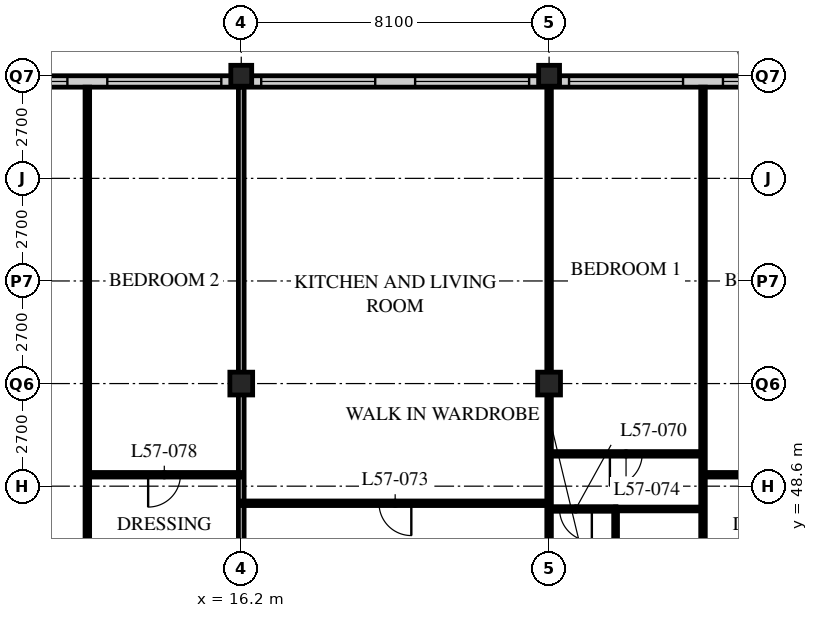
"""IFC4 building model, lengths in metres.
Left out: names, types, materials, properties, quantities, classifications, styles, units other than length and angle.
Written with IfcOpenShell. Run it as: python <this file> out.ifc"""

import sys

from ifc_helpers import new_model, si_unit, direction, frame, frame_2d, origin, origin_2d, place, context, subcontext, project, spatial, rectangle, hollow_rectangle, extrude, element, fill, save


model = new_model("IFC4")
c1 = context("Model", 3, precision=1e-05, world=origin(), true_north=direction((0.0, 1.0)))
c2 = subcontext(c1, "Body", "Model", "MODEL_VIEW")
j1 = project(units=[si_unit("LENGTHUNIT", "METRE"), si_unit("PLANEANGLEUNIT", "RADIAN")], contexts=[c1])
p1 = place(None, origin())
s1 = spatial("IfcSite", under=j1, at=p1, CompositionType="ELEMENT")
p2 = place(p1, origin())
s2 = spatial("IfcBuilding", under=s1, at=p2, CompositionType="ELEMENT")
p3 = place(p2, frame((0.0, 0.0, 220.8)))
s3 = spatial("IfcBuildingStorey", under=s2, at=p3, CompositionType="ELEMENT", Elevation=220.8)
p4 = place(p3, frame((16.2, 51.3, 0.0), z_axis=(0.0, 0.0, 1.0), x_axis=(1.0, 0.0, 0.0)))
e1 = element("IfcColumn", 1, at=p4, inside=s3, PredefinedType="COLUMN", context=c2, shape_type="SweptSolid", body=[
    extrude(hollow_rectangle(XDim=0.6, YDim=0.6, WallThickness=0.05, at=origin_2d()), origin(), (0.0, 0.0, 1.0), 3.6),
])
p5 = place(p3, frame((16.2, 59.4, 0.0), z_axis=(0.0, 0.0, 1.0), x_axis=(1.0, 0.0, 0.0)))
e2 = element("IfcColumn", 2, at=p5, inside=s3, PredefinedType="COLUMN", context=c2, shape_type="SweptSolid", body=[
    extrude(hollow_rectangle(XDim=0.55, YDim=0.55, WallThickness=0.045, at=origin_2d()), origin(), (0.0, 0.0, 1.0), 3.6),
])
p6 = place(p3, frame((24.3, 51.3, 0.0), z_axis=(0.0, 0.0, 1.0), x_axis=(1.0, 0.0, 0.0)))
e3 = element("IfcColumn", 3, at=p6, inside=s3, PredefinedType="COLUMN", context=c2, shape_type="SweptSolid", body=[
    extrude(hollow_rectangle(XDim=0.6, YDim=0.6, WallThickness=0.05, at=origin_2d()), origin(), (0.0, 0.0, 1.0), 3.6),
])
p7 = place(p3, frame((24.3, 59.4, 0.0), z_axis=(0.0, 0.0, 1.0), x_axis=(1.0, 0.0, 0.0)))
e4 = element("IfcColumn", 4, at=p7, inside=s3, PredefinedType="COLUMN", context=c2, shape_type="SweptSolid", body=[
    extrude(hollow_rectangle(XDim=0.55, YDim=0.55, WallThickness=0.045, at=origin_2d()), origin(), (0.0, 0.0, 1.0), 3.6),
])
p8 = place(p3, frame((48.3, 59.25, 0.0), z_axis=(0.0, 0.0, 1.0), x_axis=(-1.0, 0.0, 0.0)))
e5 = element("IfcWall", 5, at=p8, inside=s3, PredefinedType="SOLIDWALL", context=c2, shape_type="SweptSolid", body=[
    extrude(rectangle(XDim=40.2, YDim=0.3, at=frame_2d((20.1, 0.0))), origin(), (0.0, 0.0, 1.0), 3.39),
])
p9 = place(p8, frame((0.225, 0.0, 0.6)))
e6 = element("IfcOpeningElement", 6, at=p9, cuts=e5, PredefinedType="OPENING", context=c2, shape_type="SweptSolid", body=[
    extrude(rectangle(XDim=3.0, YDim=2.0, at=frame_2d((1.5, 1.0))), frame((0.0, 0.16, 0.0), z_axis=(0.0, -1.0, 0.0), x_axis=(1.0, 0.0, 0.0)), (0.0, 0.0, 1.0), 0.32),
])
p10 = place(p8, frame((4.275, 0.0, 0.6)))
e7 = element("IfcOpeningElement", 7, at=p10, cuts=e5, PredefinedType="OPENING", context=c2, shape_type="SweptSolid", body=[
    extrude(rectangle(XDim=3.0, YDim=2.0, at=frame_2d((1.5, 1.0))), frame((0.0, 0.16, 0.0), z_axis=(0.0, -1.0, 0.0), x_axis=(1.0, 0.0, 0.0)), (0.0, 0.0, 1.0), 0.32),
])
p11 = place(p8, frame((8.325, 0.0, 0.6)))
e8 = element("IfcOpeningElement", 8, at=p11, cuts=e5, PredefinedType="OPENING", context=c2, shape_type="SweptSolid", body=[
    extrude(rectangle(XDim=3.0, YDim=2.0, at=frame_2d((1.5, 1.0))), frame((0.0, 0.16, 0.0), z_axis=(0.0, -1.0, 0.0), x_axis=(1.0, 0.0, 0.0)), (0.0, 0.0, 1.0), 0.32),
])
p12 = place(p8, frame((12.375, 0.0, 0.6)))
e9 = element("IfcOpeningElement", 9, at=p12, cuts=e5, PredefinedType="OPENING", context=c2, shape_type="SweptSolid", body=[
    extrude(rectangle(XDim=3.0, YDim=2.0, at=frame_2d((1.5, 1.0))), frame((0.0, 0.16, 0.0), z_axis=(0.0, -1.0, 0.0), x_axis=(1.0, 0.0, 0.0)), (0.0, 0.0, 1.0), 0.32),
])
p13 = place(p8, frame((16.425, 0.0, 0.6)))
e10 = element("IfcOpeningElement", 10, at=p13, cuts=e5, PredefinedType="OPENING", context=c2, shape_type="SweptSolid", body=[
    extrude(rectangle(XDim=3.0, YDim=2.0, at=frame_2d((1.5, 1.0))), frame((0.0, 0.16, 0.0), z_axis=(0.0, -1.0, 0.0), x_axis=(1.0, 0.0, 0.0)), (0.0, 0.0, 1.0), 0.32),
])
p14 = place(p8, frame((20.475, 0.0, 0.6)))
e11 = element("IfcOpeningElement", 11, at=p14, cuts=e5, PredefinedType="OPENING", context=c2, shape_type="SweptSolid", body=[
    extrude(rectangle(XDim=3.0, YDim=2.0, at=frame_2d((1.5, 1.0))), frame((0.0, 0.16, 0.0), z_axis=(0.0, -1.0, 0.0), x_axis=(1.0, 0.0, 0.0)), (0.0, 0.0, 1.0), 0.32),
])
p15 = place(p8, frame((24.525, 0.0, 0.6)))
e12 = element("IfcOpeningElement", 12, at=p15, cuts=e5, PredefinedType="OPENING", context=c2, shape_type="SweptSolid", body=[
    extrude(rectangle(XDim=3.0, YDim=2.0, at=frame_2d((1.5, 1.0))), frame((0.0, 0.16, 0.0), z_axis=(0.0, -1.0, 0.0), x_axis=(1.0, 0.0, 0.0)), (0.0, 0.0, 1.0), 0.32),
])
p16 = place(p8, frame((28.575, 0.0, 0.6)))
e13 = element("IfcOpeningElement", 13, at=p16, cuts=e5, PredefinedType="OPENING", context=c2, shape_type="SweptSolid", body=[
    extrude(rectangle(XDim=3.0, YDim=2.0, at=frame_2d((1.5, 1.0))), frame((0.0, 0.16, 0.0), z_axis=(0.0, -1.0, 0.0), x_axis=(1.0, 0.0, 0.0)), (0.0, 0.0, 1.0), 0.32),
])
p17 = place(p8, frame((32.625, 0.0, 0.6)))
e14 = element("IfcOpeningElement", 14, at=p17, cuts=e5, PredefinedType="OPENING", context=c2, shape_type="SweptSolid", body=[
    extrude(rectangle(XDim=3.0, YDim=2.0, at=frame_2d((1.5, 1.0))), frame((0.0, 0.16, 0.0), z_axis=(0.0, -1.0, 0.0), x_axis=(1.0, 0.0, 0.0)), (0.0, 0.0, 1.0), 0.32),
])
p18 = place(p8, frame((36.675, 0.0, 0.6)))
e15 = element("IfcOpeningElement", 15, at=p18, cuts=e5, PredefinedType="OPENING", context=c2, shape_type="SweptSolid", body=[
    extrude(rectangle(XDim=3.0, YDim=2.0, at=frame_2d((1.5, 1.0))), frame((0.0, 0.16, 0.0), z_axis=(0.0, -1.0, 0.0), x_axis=(1.0, 0.0, 0.0)), (0.0, 0.0, 1.0), 0.32),
])
p19 = place(p3, frame((26.05, 45.6, 0.0), z_axis=(0.0, 0.0, 1.0), x_axis=(0.0, 1.0, 0.0)))
e16 = element("IfcWall", 16, at=p19, inside=s3, PredefinedType="PARTITIONING", context=c2, shape_type="SweptSolid", body=[
    extrude(rectangle(XDim=2.4, YDim=0.1, at=frame_2d((1.2, 0.0))), origin(), (0.0, 0.0, 1.0), 3.39),
])
p20 = place(p19, frame((0.8, 0.0, 0.0)))
e17 = element("IfcOpeningElement", 17, at=p20, cuts=e16, PredefinedType="OPENING", context=c2, shape_type="SweptSolid", body=[
    extrude(rectangle(XDim=0.8, YDim=2.1, at=frame_2d((0.4, 1.05))), frame((0.0, 0.06, 0.0), z_axis=(0.0, -1.0, 0.0), x_axis=(1.0, 0.0, 0.0)), (0.0, 0.0, 1.0), 0.12),
])
p21 = place(p3, frame((26.05, 48.0, 0.0), z_axis=(0.0, 0.0, 1.0), x_axis=(1.0, 0.0, 0.0)))
e18 = element("IfcWall", 18, at=p21, inside=s3, PredefinedType="PARTITIONING", context=c2, shape_type="SweptSolid", body=[
    extrude(rectangle(XDim=2.3, YDim=0.1, at=frame_2d((1.15, 0.0))), origin(), (0.0, 0.0, 1.0), 3.39),
])
p22 = place(p3, frame((24.3, 45.6, 0.0), z_axis=(0.0, 0.0, 1.0), x_axis=(0.0, 1.0, 0.0)))
e19 = element("IfcWall", 19, at=p22, inside=s3, PredefinedType="PARTITIONING", context=c2, shape_type="SweptSolid", body=[
    extrude(rectangle(XDim=13.5, YDim=0.12, at=frame_2d((6.75, 0.0))), origin(), (0.0, 0.0, 1.0), 2.628),
])
for number, where, z_axis, x_axis in (
    (20, (28.35, 45.6, 0.0), (0.0, 0.0, 1.0), (0.0, 1.0, 0.0)),
    (21, (12.15, 45.6, 0.0), (0.0, 0.0, 1.0), (0.0, 1.0, 0.0)),
):
    element("IfcWall", number, at=place(p3, frame(where, z_axis=z_axis, x_axis=x_axis)), inside=s3, PredefinedType="PARTITIONING", context=c2, shape_type="SweptSolid", body=[
        extrude(rectangle(XDim=13.5, YDim=0.12, at=frame_2d((6.75, 0.0))), origin(), (0.0, 0.0, 1.0), 3.39),
    ])
p23 = place(p3, frame((16.2, 43.2, 0.0), z_axis=(0.0, 0.0, 1.0), x_axis=(0.0, 1.0, 0.0)))
e22 = element("IfcWall", 22, at=p23, inside=s3, PredefinedType="PARTITIONING", context=c2, shape_type="SweptSolid", body=[
    extrude(rectangle(XDim=15.9, YDim=0.15, at=frame_2d((7.95, 0.0))), origin(), (0.0, 0.0, 1.0), 2.628),
])
p24 = place(p3, frame((24.3, 48.0, 0.0), z_axis=(0.0, 0.0, 1.0), x_axis=(1.0, 0.0, 0.0)))
e23 = element("IfcWall", 23, at=p24, inside=s3, PredefinedType="PARTITIONING", context=c2, shape_type="SweptSolid", body=[
    extrude(rectangle(XDim=1.76, YDim=0.12, at=frame_2d((0.88, 0.0))), origin(), (0.0, 0.0, 1.0), 3.39),
])
p25 = place(p24, frame((0.275, 0.0, 0.0)))
e24 = element("IfcOpeningElement", 24, at=p25, cuts=e23, PredefinedType="OPENING", context=c2, shape_type="SweptSolid", body=[
    extrude(rectangle(XDim=0.85, YDim=2.1, at=frame_2d((0.425, 1.05))), frame((0.0, 0.07, 0.0), z_axis=(0.0, -1.0, 0.0), x_axis=(1.0, 0.0, 0.0)), (0.0, 0.0, 1.0), 0.14),
])
p26 = place(p3, frame((16.2, 48.15, 0.0), z_axis=(0.0, 0.0, 1.0), x_axis=(1.0, 0.0, 0.0)))
e25 = element("IfcWall", 25, at=p26, inside=s3, PredefinedType="PARTITIONING", context=c2, shape_type="SweptSolid", body=[
    extrude(rectangle(XDim=8.1, YDim=0.12, at=frame_2d((4.05, 0.0))), origin(), (0.0, 0.0, 1.0), 3.39),
])
p27 = place(p26, frame((3.625, 0.0, 0.0)))
e26 = element("IfcOpeningElement", 26, at=p27, cuts=e25, PredefinedType="OPENING", context=c2, shape_type="SweptSolid", body=[
    extrude(rectangle(XDim=0.85, YDim=2.1, at=frame_2d((0.425, 1.05))), frame((0.0, 0.07, 0.0), z_axis=(0.0, -1.0, 0.0), x_axis=(1.0, 0.0, 0.0)), (0.0, 0.0, 1.0), 0.14),
])
p28 = place(p3, frame((24.3, 49.45, 0.0), z_axis=(0.0, 0.0, 1.0), x_axis=(1.0, 0.0, 0.0)))
e27 = element("IfcWall", 27, at=p28, inside=s3, PredefinedType="PARTITIONING", context=c2, shape_type="SweptSolid", body=[
    extrude(rectangle(XDim=4.05, YDim=0.12, at=frame_2d((2.025, 0.0))), origin(), (0.0, 0.0, 1.0), 3.39),
])
p29 = place(p28, frame((1.6, 0.0, 0.0)))
e28 = element("IfcOpeningElement", 28, at=p29, cuts=e27, PredefinedType="OPENING", context=c2, shape_type="SweptSolid", body=[
    extrude(rectangle(XDim=0.85, YDim=2.1, at=frame_2d((0.425, 1.05))), frame((0.0, 0.07, 0.0), z_axis=(0.0, -1.0, 0.0), x_axis=(1.0, 0.0, 0.0)), (0.0, 0.0, 1.0), 0.14),
])
p30 = place(p3, frame((28.35, 48.9, 0.0), z_axis=(0.0, 0.0, 1.0), x_axis=(1.0, 0.0, 0.0)))
e29 = element("IfcWall", 29, at=p30, inside=s3, PredefinedType="PARTITIONING", context=c2, shape_type="SweptSolid", body=[
    extrude(rectangle(XDim=8.1, YDim=0.12, at=frame_2d((4.05, 0.0))), origin(), (0.0, 0.0, 1.0), 3.39),
])
p31 = place(p30, frame((1.6, 0.0, 0.0)))
e30 = element("IfcOpeningElement", 30, at=p31, cuts=e29, PredefinedType="OPENING", context=c2, shape_type="SweptSolid", body=[
    extrude(rectangle(XDim=0.85, YDim=2.1, at=frame_2d((0.425, 1.05))), frame((0.0, 0.07, 0.0), z_axis=(0.0, -1.0, 0.0), x_axis=(1.0, 0.0, 0.0)), (0.0, 0.0, 1.0), 0.14),
])
p32 = place(p30, frame((5.65, 0.0, 0.0)))
e31 = element("IfcOpeningElement", 31, at=p32, cuts=e29, PredefinedType="OPENING", context=c2, shape_type="SweptSolid", body=[
    extrude(rectangle(XDim=0.85, YDim=2.1, at=frame_2d((0.425, 1.05))), frame((0.0, 0.07, 0.0), z_axis=(0.0, -1.0, 0.0), x_axis=(1.0, 0.0, 0.0)), (0.0, 0.0, 1.0), 0.14),
])
p33 = place(p3, frame((12.15, 48.9, 0.0), z_axis=(0.0, 0.0, 1.0), x_axis=(1.0, 0.0, 0.0)))
e32 = element("IfcWall", 32, at=p33, inside=s3, PredefinedType="PARTITIONING", context=c2, shape_type="SweptSolid", body=[
    extrude(rectangle(XDim=4.05, YDim=0.12, at=frame_2d((2.025, 0.0))), origin(), (0.0, 0.0, 1.0), 3.39),
])
p34 = place(p33, frame((1.6, 0.0, 0.0)))
e33 = element("IfcOpeningElement", 33, at=p34, cuts=e32, PredefinedType="OPENING", context=c2, shape_type="SweptSolid", body=[
    extrude(rectangle(XDim=0.85, YDim=2.1, at=frame_2d((0.425, 1.05))), frame((0.0, 0.07, 0.0), z_axis=(0.0, -1.0, 0.0), x_axis=(1.0, 0.0, 0.0)), (0.0, 0.0, 1.0), 0.14),
])
p35 = place(p13, origin())
e34 = element("IfcWindow", 34, at=p35, inside=s3, PartitioningType="SINGLE_PANEL", PredefinedType="WINDOW", context=c2, shape_type="SweptSolid", body=[
    extrude(rectangle(XDim=3.0, YDim=2.0, at=frame_2d((1.5, 1.0))), frame((0.0, 0.03, 0.0), z_axis=(0.0, -1.0, 0.0), x_axis=(1.0, 0.0, 0.0)), (0.0, 0.0, 1.0), 0.06),
])
fill(e10, e34)
p36 = place(p14, origin())
e35 = element("IfcWindow", 35, at=p36, inside=s3, PartitioningType="SINGLE_PANEL", PredefinedType="WINDOW", context=c2, shape_type="SweptSolid", body=[
    extrude(rectangle(XDim=3.0, YDim=2.0, at=frame_2d((1.5, 1.0))), frame((0.0, 0.03, 0.0), z_axis=(0.0, -1.0, 0.0), x_axis=(1.0, 0.0, 0.0)), (0.0, 0.0, 1.0), 0.06),
])
fill(e11, e35)
p37 = place(p15, origin())
e36 = element("IfcWindow", 36, at=p37, inside=s3, PartitioningType="SINGLE_PANEL", PredefinedType="WINDOW", context=c2, shape_type="SweptSolid", body=[
    extrude(rectangle(XDim=3.0, YDim=2.0, at=frame_2d((1.5, 1.0))), frame((0.0, 0.03, 0.0), z_axis=(0.0, -1.0, 0.0), x_axis=(1.0, 0.0, 0.0)), (0.0, 0.0, 1.0), 0.06),
])
fill(e12, e36)
p38 = place(p16, origin())
e37 = element("IfcWindow", 37, at=p38, inside=s3, PartitioningType="SINGLE_PANEL", PredefinedType="WINDOW", context=c2, shape_type="SweptSolid", body=[
    extrude(rectangle(XDim=3.0, YDim=2.0, at=frame_2d((1.5, 1.0))), frame((0.0, 0.03, 0.0), z_axis=(0.0, -1.0, 0.0), x_axis=(1.0, 0.0, 0.0)), (0.0, 0.0, 1.0), 0.06),
])
fill(e13, e37)
p39 = place(p17, origin())
e38 = element("IfcWindow", 38, at=p39, inside=s3, PartitioningType="SINGLE_PANEL", PredefinedType="WINDOW", context=c2, shape_type="SweptSolid", body=[
    extrude(rectangle(XDim=3.0, YDim=2.0, at=frame_2d((1.5, 1.0))), frame((0.0, 0.03, 0.0), z_axis=(0.0, -1.0, 0.0), x_axis=(1.0, 0.0, 0.0)), (0.0, 0.0, 1.0), 0.06),
])
fill(e14, e38)
p40 = place(p18, origin())
e39 = element("IfcWindow", 39, at=p40, inside=s3, PartitioningType="SINGLE_PANEL", PredefinedType="WINDOW", context=c2, shape_type="SweptSolid", body=[
    extrude(rectangle(XDim=3.0, YDim=2.0, at=frame_2d((1.5, 1.0))), frame((0.0, 0.03, 0.0), z_axis=(0.0, -1.0, 0.0), x_axis=(1.0, 0.0, 0.0)), (0.0, 0.0, 1.0), 0.06),
])
fill(e15, e39)
p41 = place(p25, origin())
e40 = element("IfcDoor", 40, at=p41, inside=s3, OperationType="SINGLE_SWING_LEFT", PredefinedType="DOOR", context=c2, shape_type="SweptSolid", body=[
    extrude(rectangle(XDim=0.85, YDim=2.1, at=frame_2d((0.425, 1.05))), frame((0.0, 0.025, 0.0), z_axis=(0.0, -1.0, 0.0), x_axis=(1.0, 0.0, 0.0)), (0.0, 0.0, 1.0), 0.05),
])
fill(e24, e40)
p42 = place(p27, origin())
e41 = element("IfcDoor", 41, at=p42, inside=s3, OperationType="SINGLE_SWING_LEFT", PredefinedType="DOOR", context=c2, shape_type="SweptSolid", body=[
    extrude(rectangle(XDim=0.85, YDim=2.1, at=frame_2d((0.425, 1.05))), frame((0.0, 0.025, 0.0), z_axis=(0.0, -1.0, 0.0), x_axis=(1.0, 0.0, 0.0)), (0.0, 0.0, 1.0), 0.05),
])
fill(e26, e41)
p43 = place(p29, origin())
e42 = element("IfcDoor", 42, at=p43, inside=s3, OperationType="SINGLE_SWING_RIGHT", PredefinedType="DOOR", context=c2, shape_type="SweptSolid", body=[
    extrude(rectangle(XDim=0.85, YDim=2.1, at=frame_2d((0.425, 1.05))), frame((0.0, 0.025, 0.0), z_axis=(0.0, -1.0, 0.0), x_axis=(1.0, 0.0, 0.0)), (0.0, 0.0, 1.0), 0.05),
])
fill(e28, e42)
p44 = place(p34, origin())
e43 = element("IfcDoor", 43, at=p44, inside=s3, OperationType="SINGLE_SWING_RIGHT", PredefinedType="DOOR", context=c2, shape_type="SweptSolid", body=[
    extrude(rectangle(XDim=0.85, YDim=2.1, at=frame_2d((0.425, 1.05))), frame((0.0, 0.025, 0.0), z_axis=(0.0, -1.0, 0.0), x_axis=(1.0, 0.0, 0.0)), (0.0, 0.0, 1.0), 0.05),
])
fill(e33, e43)
save(model, sys.argv[1])
